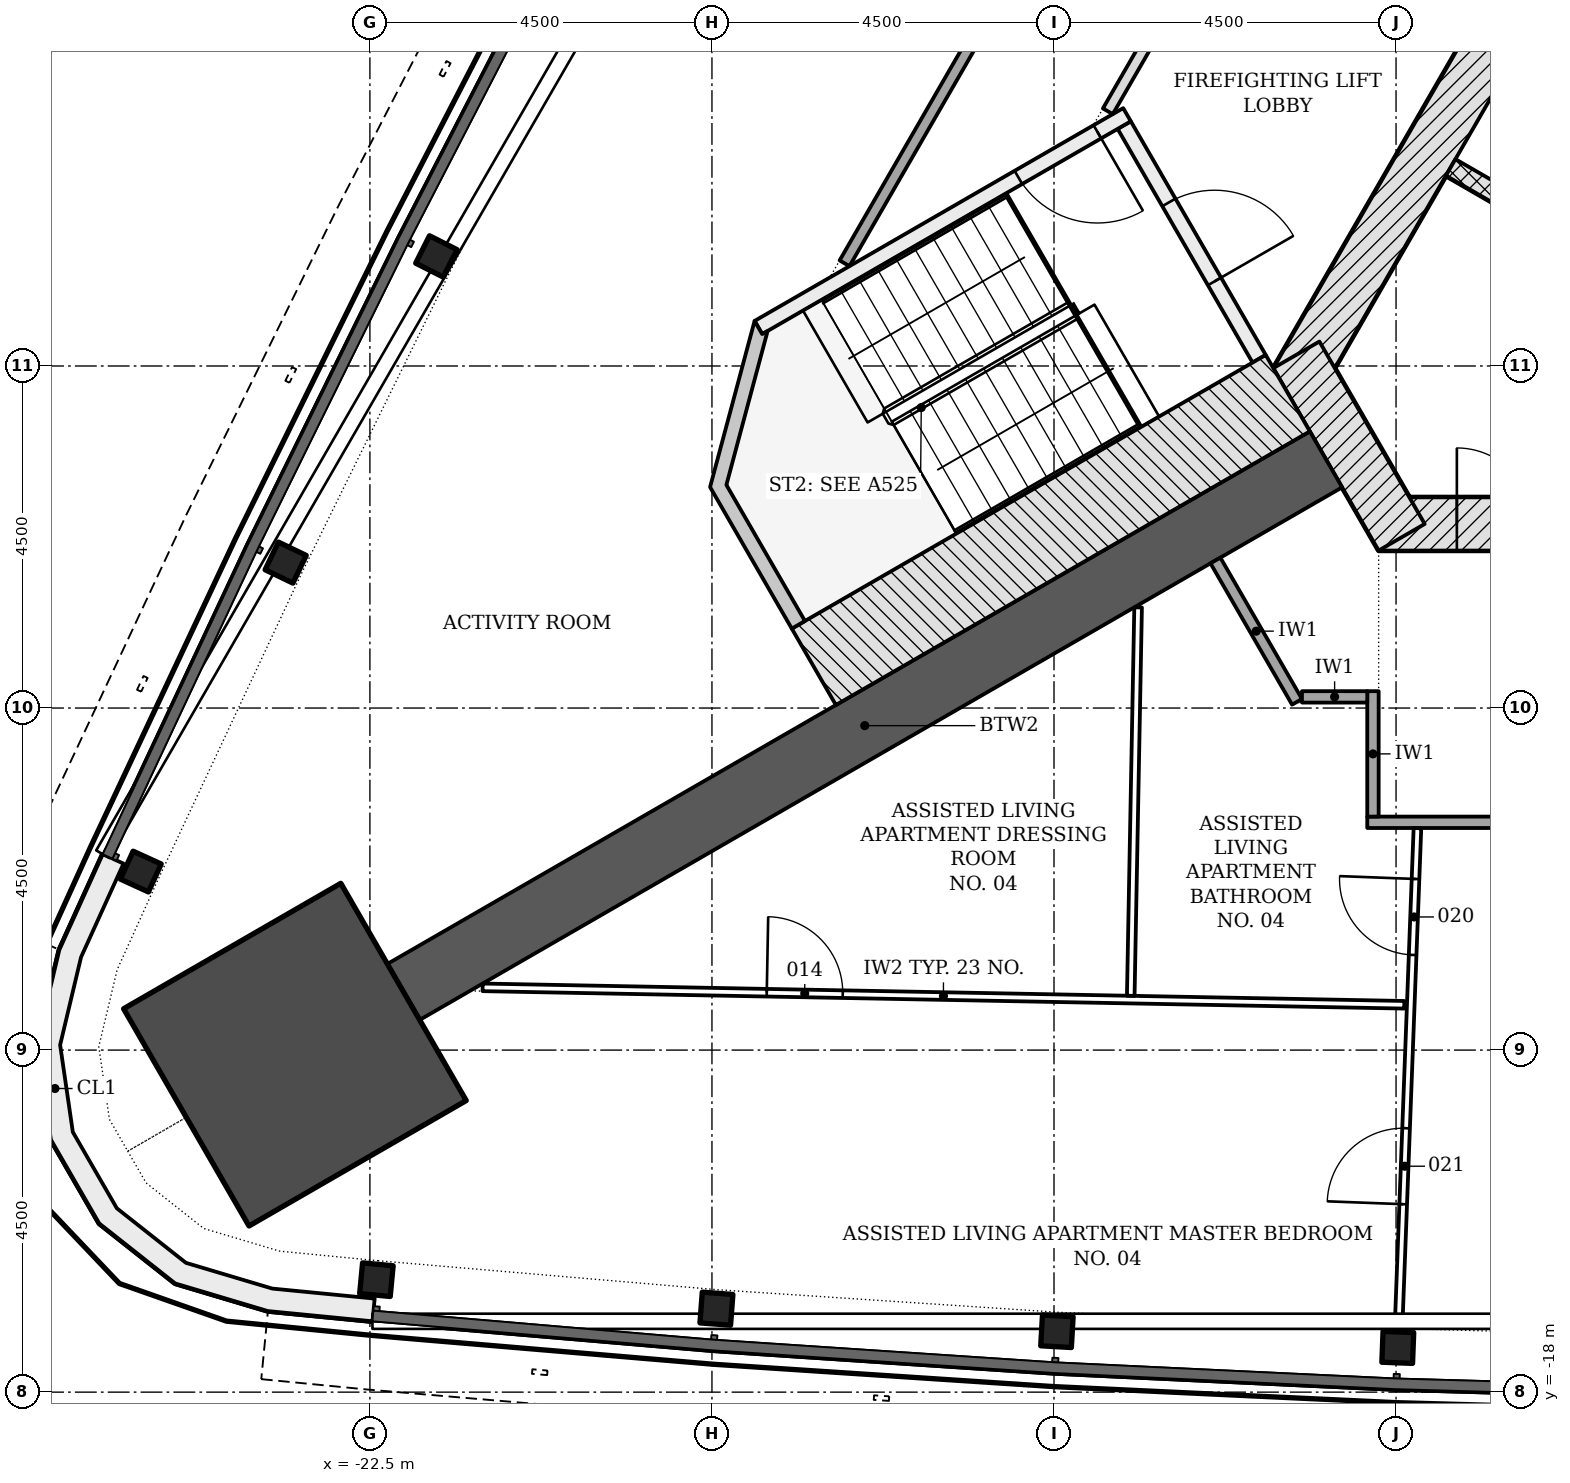
"""IFC4 building model, lengths in metres.
Left out: names, types, materials, properties, quantities, classifications, styles, units other than length and angle.
Written with IfcOpenShell. Run it as: python <this file> out.ifc"""

import sys

from ifc_helpers import new_model, si_unit, direction, frame, frame_2d, origin, origin_2d, place, context, subcontext, project, spatial, polyline, rectangle, i_section, outline, extrude, element, fill, save


model = new_model("IFC4")
c1 = context("Model", 3, precision=1e-05, world=origin(), true_north=direction((0.0, 1.0)))
c2 = subcontext(c1, "Body", "Model", "MODEL_VIEW")
j1 = project(units=[si_unit("LENGTHUNIT", "METRE"), si_unit("PLANEANGLEUNIT", "RADIAN")], contexts=[c1])
p1 = place(None, origin())
s1 = spatial("IfcSite", under=j1, at=p1, CompositionType="ELEMENT")
p2 = place(p1, origin())
s2 = spatial("IfcBuilding", under=s1, at=p2, CompositionType="ELEMENT")
p3 = place(p2, frame((0.0, 0.0, 45.6)))
s3 = spatial("IfcBuildingStorey", under=s2, at=p3, CompositionType="ELEMENT", Elevation=45.6)
p4 = place(p3, frame((-9.229, -6.578, -0.2), z_axis=(0.0, 0.0, 1.0), x_axis=(1.0, 0.0, 0.0)))
e1 = element("IfcWall", 1, at=p4, inside=s3, PredefinedType="SHEAR", context=c2, shape_type="SweptSolid", body=[
    extrude(rectangle(XDim=18.458, YDim=0.7, at=frame_2d((9.229, 0.0))), origin(), (0.0, 0.0, 1.0), 3.6),
])
p5 = place(p4, frame((3.304, 0.0, 0.2)))
e2 = element("IfcOpeningElement", 2, at=p5, cuts=e1, PredefinedType="OPENING", context=c2, shape_type="SweptSolid", body=[
    extrude(rectangle(XDim=1.1, YDim=2.1, at=frame_2d((0.55, 1.05))), frame((0.0, 0.36, 0.0), z_axis=(0.0, -1.0, 0.0), x_axis=(1.0, 0.0, 0.0)), (0.0, 0.0, 1.0), 0.72),
])
p6 = place(p4, frame((5.454, 0.0, 0.2)))
e3 = element("IfcOpeningElement", 3, at=p6, cuts=e1, PredefinedType="OPENING", context=c2, shape_type="SweptSolid", body=[
    extrude(rectangle(XDim=1.1, YDim=2.1, at=frame_2d((0.55, 1.05))), frame((0.0, 0.36, 0.0), z_axis=(0.0, -1.0, 0.0), x_axis=(1.0, 0.0, 0.0)), (0.0, 0.0, 1.0), 0.72),
])
p7 = place(p4, frame((7.604, 0.0, 0.2)))
e4 = element("IfcOpeningElement", 4, at=p7, cuts=e1, PredefinedType="OPENING", context=c2, shape_type="SweptSolid", body=[
    extrude(rectangle(XDim=1.1, YDim=2.1, at=frame_2d((0.55, 1.05))), frame((0.0, 0.36, 0.0), z_axis=(0.0, -1.0, 0.0), x_axis=(1.0, 0.0, 0.0)), (0.0, 0.0, 1.0), 0.72),
])
p8 = place(p4, frame((9.754, 0.0, 0.2)))
e5 = element("IfcOpeningElement", 5, at=p8, cuts=e1, PredefinedType="OPENING", context=c2, shape_type="SweptSolid", body=[
    extrude(rectangle(XDim=1.1, YDim=2.1, at=frame_2d((0.55, 1.05))), frame((0.0, 0.36, 0.0), z_axis=(0.0, -1.0, 0.0), x_axis=(1.0, 0.0, 0.0)), (0.0, 0.0, 1.0), 0.72),
])
p9 = place(p4, frame((11.904, 0.0, 0.2)))
e6 = element("IfcOpeningElement", 6, at=p9, cuts=e1, PredefinedType="OPENING", context=c2, shape_type="SweptSolid", body=[
    extrude(rectangle(XDim=1.1, YDim=2.1, at=frame_2d((0.55, 1.05))), frame((0.0, 0.36, 0.0), z_axis=(0.0, -1.0, 0.0), x_axis=(1.0, 0.0, 0.0)), (0.0, 0.0, 1.0), 0.72),
])
p10 = place(p4, frame((14.054, 0.0, 0.2)))
e7 = element("IfcOpeningElement", 7, at=p10, cuts=e1, PredefinedType="OPENING", context=c2, shape_type="SweptSolid", body=[
    extrude(rectangle(XDim=1.1, YDim=2.1, at=frame_2d((0.55, 1.05))), frame((0.0, 0.36, 0.0), z_axis=(0.0, -1.0, 0.0), x_axis=(1.0, 0.0, 0.0)), (0.0, 0.0, 1.0), 0.72),
])
p11 = place(p4, frame((1.029, 0.0, 0.2)))
e8 = element("IfcOpeningElement", 8, at=p11, cuts=e1, PredefinedType="OPENING", context=c2, shape_type="SweptSolid", body=[
    extrude(rectangle(XDim=1.0, YDim=2.1, at=frame_2d((0.5, 1.05))), frame((0.0, 0.36, 0.0), z_axis=(0.0, -1.0, 0.0), x_axis=(1.0, 0.0, 0.0)), (0.0, 0.0, 1.0), 0.72),
])
p12 = place(p3, frame((-1.083, 11.281, -0.2), z_axis=(0.0, 0.0, 1.0), x_axis=(-0.500001446645, -0.866024568562, 0.0)))
e9 = element("IfcWall", 9, at=p12, inside=s3, PredefinedType="SHEAR", context=c2, shape_type="SweptSolid", body=[
    extrude(rectangle(XDim=18.458, YDim=0.7, at=frame_2d((9.229, 0.0))), origin(), (0.0, 0.0, 1.0), 3.6),
])
p13 = place(p12, frame((8.979, 0.0, 0.2)))
e10 = element("IfcOpeningElement", 10, at=p13, cuts=e9, PredefinedType="OPENING", context=c2, shape_type="SweptSolid", body=[
    extrude(rectangle(XDim=1.2, YDim=2.1, at=frame_2d((0.6, 1.05))), frame((0.0, 0.36, 0.0), z_axis=(0.0, -1.0, 0.0), x_axis=(1.0, 0.0, 0.0)), (0.0, 0.0, 1.0), 0.72),
])
p14 = place(p12, frame((11.029, 0.0, 0.2)))
e11 = element("IfcOpeningElement", 11, at=p14, cuts=e9, PredefinedType="OPENING", context=c2, shape_type="SweptSolid", body=[
    extrude(rectangle(XDim=1.2, YDim=2.1, at=frame_2d((0.6, 1.05))), frame((0.0, 0.36, 0.0), z_axis=(0.0, -1.0, 0.0), x_axis=(1.0, 0.0, 0.0)), (0.0, 0.0, 1.0), 0.72),
])
p15 = place(p3, frame((-10.311, -4.353, -0.2), z_axis=(0.0, 0.0, 1.0), x_axis=(0.500042739161, -0.866000726912, 0.0)))
e12 = element("IfcWall", 12, at=p15, inside=s3, PredefinedType="SHEAR", context=c2, shape_type="SweptSolid", body=[
    extrude(rectangle(XDim=2.771, YDim=0.7, at=frame_2d((1.386, 0.0))), origin(), (0.0, 0.0, 1.0), 3.6),
])
p16 = place(p3, frame((-9.922, -5.728, -0.2), z_axis=(0.0, 0.0, 1.0), x_axis=(-0.866021666006, -0.500006473966, 0.0)))
e13 = element("IfcWall", 13, at=p16, inside=s3, PredefinedType="SHEAR", context=c2, shape_type="SweptSolid", body=[
    extrude(rectangle(XDim=14.013, YDim=0.85, at=frame_2d((7.007, 0.0))), origin(), (0.0, 0.0, 1.0), 3.6),
])
p17 = place(p3, frame((-23.487, -13.56, -0.2), z_axis=(0.0, 0.0, 1.0), x_axis=(-0.866025403784, -0.5, 0.0)))
e14 = element("IfcColumn", 14, at=p17, inside=s3, PredefinedType="COLUMN", context=c2, shape_type="SweptSolid", body=[
    extrude(rectangle(XDim=3.3, YDim=3.3, at=origin_2d()), origin(), (0.0, 0.0, 1.0), 3.6),
])
for number, where, z_axis, x_axis in (
    (15, (-21.626, -3.059, -0.2), (0.0, 0.0, 1.0), (-0.45, -0.893, 0.0)),
    (16, (-23.608, -7.086, -0.2), (0.0, 0.0, 1.0), (-0.433, -0.901, 0.0)),
    (17, (-25.514, -11.151, -0.2), (0.0, 0.0, 1.0), (-0.416, -0.909, 0.0)),
    (18, (-22.415, -16.521, -0.2), (0.0, 0.0, 1.0), (0.996, -0.094, 0.0)),
    (19, (-17.941, -16.902, -0.2), (0.0, 0.0, 1.0), (0.997, -0.076, 0.0)),
    (20, (-13.462, -17.199, -0.2), (0.0, 0.0, 1.0), (0.998, -0.057, 0.0)),
    (21, (-8.977, -17.411, -0.2), (0.0, 0.0, 1.0), (0.999, -0.038, 0.0)),
):
    element("IfcColumn", number, at=place(p3, frame(where, z_axis=z_axis, x_axis=x_axis)), inside=s3, PredefinedType="COLUMN", context=c2, shape_type="SweptSolid", body=[
        extrude(i_section(OverallWidth=0.404, OverallDepth=0.406, WebThickness=0.027, FlangeThickness=0.044, FilletRadius=0.015, at=origin_2d()), origin(), (0.0, 0.0, 1.0), 3.6),
    ])
p18 = place(p3, origin())
e22 = element("IfcWall", 22, at=p18, inside=s3, PredefinedType="NOTDEFINED", context=c2, shape_type="SweptSolid", body=[
    extrude(outline(polyline([(-26.014, -10.923), (-26.586, -12.181), (-26.881, -13.419), (-26.697, -14.679), (-26.061, -15.781), (-25.062, -16.57), (-23.842, -16.933), (-22.467, -17.068), (-22.437, -16.769), (-23.784, -16.638), (-24.921, -16.299), (-25.829, -15.581), (-26.408, -14.578), (-26.575, -13.433), (-26.301, -12.279), (-25.741, -11.047), (-26.014, -10.923)])), origin(), (0.0, 0.0, 1.0), 3.3),
])
p19 = place(p3, frame((-8.281, -1.887, -0.2), z_axis=(0.0, 0.0, 1.0), x_axis=(0.866032775405, -0.499987231761, 0.0)))
e23 = element("IfcWall", 23, at=p19, inside=s3, PredefinedType="PARTITIONING", context=c2, shape_type="SweptSolid", body=[
    extrude(rectangle(XDim=2.9, YDim=0.25, at=frame_2d((1.45, 0.0))), origin(), (0.0, 0.0, 1.0), 3.6),
])
p20 = place(p3, frame((-12.576, -1.331, -0.2), z_axis=(0.0, 0.0, 1.0), x_axis=(0.499970499736, -0.8660424351, 0.0)))
e24 = element("IfcWall", 24, at=p20, inside=s3, PredefinedType="SHEAR", context=c2, shape_type="SweptSolid", body=[
    extrude(rectangle(XDim=3.55, YDim=0.2, at=frame_2d((1.775, 0.0))), origin(), (0.0, 0.0, 1.0), 3.6),
])
p21 = place(p20, frame((1.175, 0.0, 0.2)))
e25 = element("IfcOpeningElement", 25, at=p21, cuts=e24, PredefinedType="OPENING", context=c2, shape_type="SweptSolid", body=[
    extrude(rectangle(XDim=1.2, YDim=2.1, at=frame_2d((0.6, 1.05))), frame((0.0, 0.11, 0.0), z_axis=(0.0, -1.0, 0.0), x_axis=(1.0, 0.0, 0.0)), (0.0, 0.0, 1.0), 0.22),
])
p22 = place(p3, frame((-12.539, -1.194, -0.2), z_axis=(0.0, 0.0, 1.0), x_axis=(-0.866045472092, -0.499965239061, 0.0)))
e26 = element("IfcWall", 26, at=p22, inside=s3, PredefinedType="SHEAR", context=c2, shape_type="SweptSolid", body=[
    extrude(rectangle(XDim=5.6, YDim=0.2, at=frame_2d((2.8, 0.0))), origin(), (0.0, 0.0, 1.0), 3.6),
])
p23 = place(p22, frame((0.45, 0.0, 0.2)))
e27 = element("IfcOpeningElement", 27, at=p23, cuts=e26, PredefinedType="OPENING", context=c2, shape_type="SweptSolid", body=[
    extrude(rectangle(XDim=1.2, YDim=2.1, at=frame_2d((0.6, 1.05))), frame((0.0, 0.11, 0.0), z_axis=(0.0, -1.0, 0.0), x_axis=(1.0, 0.0, 0.0)), (0.0, 0.0, 1.0), 0.22),
])
p24 = place(p3, frame((-10.424, -4.858, -0.2), z_axis=(0.0, 0.0, 1.0), x_axis=(-0.866033125095, -0.499986626058, 0.0)))
e28 = element("IfcWall", 28, at=p24, inside=s3, PredefinedType="SHEAR", context=c2, shape_type="SweptSolid", body=[
    extrude(rectangle(XDim=7.2, YDim=1.161, at=frame_2d((3.6, 0.0))), origin(), (0.0, 0.0, 1.0), 3.6),
])
p25 = place(p3, frame((0.0, 0.0, -0.2)))
e29 = element("IfcWall", 29, at=p25, inside=s3, PredefinedType="SHEAR", context=c2, shape_type="SweptSolid", body=[
    extrude(outline(polyline([(-17.439, -3.907), (-18.025, -6.093), (-16.95, -7.955), (-16.777, -7.855), (-17.81, -6.065), (-17.267, -4.039), (-17.339, -4.081), (-17.339, -4.081), (-17.339, -4.081), (-17.339, -4.081), (-17.339, -4.081), (-17.339, -4.081), (-17.339, -4.081), (-17.339, -4.081), (-17.339, -4.081), (-17.339, -4.081), (-17.339, -4.081), (-17.339, -4.081), (-17.339, -4.081), (-17.339, -4.081), (-17.339, -4.081), (-17.339, -4.081), (-17.339, -4.081), (-17.439, -3.907)])), origin(), (0.0, 0.0, 1.0), 3.6),
])
p26 = place(p3, frame((-16.256, -3.149, 0.0), z_axis=(0.0, 0.0, 1.0), x_axis=(0.499999683919, 0.866025586274, 0.0)))
e30 = element("IfcWall", 30, at=p26, inside=s3, PredefinedType="PARTITIONING", context=c2, shape_type="SweptSolid", body=[
    extrude(rectangle(XDim=22.234, YDim=0.15, at=frame_2d((11.117, 0.0))), origin(), (0.0, 0.0, 1.0), 2.778),
])
p27 = place(p26, frame((17.842, 0.0, 0.0)))
e31 = element("IfcOpeningElement", 31, at=p27, cuts=e30, PredefinedType="OPENING", context=c2, shape_type="SweptSolid", body=[
    extrude(rectangle(XDim=1.0, YDim=2.1, at=frame_2d((0.5, 1.05))), frame((0.0, 0.085, 0.0), z_axis=(0.0, -1.0, 0.0), x_axis=(1.0, 0.0, 0.0)), (0.0, 0.0, 1.0), 0.17),
])
p28 = place(p26, frame((15.26, 0.0, 0.0)))
e32 = element("IfcOpeningElement", 32, at=p28, cuts=e30, PredefinedType="OPENING", context=c2, shape_type="SweptSolid", body=[
    extrude(rectangle(XDim=1.0, YDim=2.1, at=frame_2d((0.5, 1.05))), frame((0.0, 0.085, 0.0), z_axis=(0.0, -1.0, 0.0), x_axis=(1.0, 0.0, 0.0)), (0.0, 0.0, 1.0), 0.17),
])
p29 = place(p26, frame((11.92, 0.0, 0.0)))
e33 = element("IfcOpeningElement", 33, at=p29, cuts=e30, PredefinedType="OPENING", context=c2, shape_type="SweptSolid", body=[
    extrude(rectangle(XDim=1.5, YDim=2.1, at=frame_2d((0.75, 1.05))), frame((0.0, 0.085, 0.0), z_axis=(0.0, -1.0, 0.0), x_axis=(1.0, 0.0, 0.0)), (0.0, 0.0, 1.0), 0.17),
])
p30 = place(p26, frame((4.547, 0.0, 0.0)))
e34 = element("IfcOpeningElement", 34, at=p30, cuts=e30, PredefinedType="OPENING", context=c2, shape_type="SweptSolid", body=[
    extrude(rectangle(XDim=1.5, YDim=2.1, at=frame_2d((0.75, 1.05))), frame((0.0, 0.085, 0.0), z_axis=(0.0, -1.0, 0.0), x_axis=(1.0, 0.0, 0.0)), (0.0, 0.0, 1.0), 0.17),
])
p31 = place(p3, frame((-4.407, 13.374, 0.0), z_axis=(0.0, 0.0, 1.0), x_axis=(-0.499997181693, -0.866027030928, 0.0)))
e35 = element("IfcWall", 35, at=p31, inside=s3, PredefinedType="PARTITIONING", context=c2, shape_type="SweptSolid", body=[
    extrude(rectangle(XDim=16.77, YDim=0.15, at=frame_2d((8.385, 0.0))), origin(), (0.0, 0.0, 1.0), 2.778),
])
p32 = place(p31, frame((8.879, 0.0, 0.0)))
e36 = element("IfcOpeningElement", 36, at=p32, cuts=e35, PredefinedType="OPENING", context=c2, shape_type="SweptSolid", body=[
    extrude(rectangle(XDim=1.0, YDim=2.1, at=frame_2d((0.5, 1.05))), frame((0.0, 0.085, 0.0), z_axis=(0.0, -1.0, 0.0), x_axis=(1.0, 0.0, 0.0)), (0.0, 0.0, 1.0), 0.17),
])
p33 = place(p3, frame((3.689, -10.503, 0.0), z_axis=(0.0, 0.0, 1.0), x_axis=(-1.0, 0.0, 0.0)))
e37 = element("IfcWall", 37, at=p33, inside=s3, PredefinedType="PARTITIONING", context=c2, shape_type="SweptSolid", body=[
    extrude(rectangle(XDim=13.068, YDim=0.15, at=frame_2d((6.534, 0.0))), origin(), (0.0, 0.0, 1.0), 2.778),
])
p34 = place(p33, frame((9.74, 0.0, 0.0)))
e38 = element("IfcOpeningElement", 38, at=p34, cuts=e37, PredefinedType="OPENING", context=c2, shape_type="SweptSolid", body=[
    extrude(rectangle(XDim=1.0, YDim=2.1, at=frame_2d((0.5, 1.05))), frame((0.0, 0.085, 0.0), z_axis=(0.0, -1.0, 0.0), x_axis=(1.0, 0.0, 0.0)), (0.0, 0.0, 1.0), 0.17),
])
p35 = place(p33, frame((4.175, 0.0, 0.0)))
e39 = element("IfcOpeningElement", 39, at=p35, cuts=e37, PredefinedType="OPENING", context=c2, shape_type="SweptSolid", body=[
    extrude(rectangle(XDim=1.0, YDim=2.1, at=frame_2d((0.5, 1.05))), frame((0.0, 0.085, 0.0), z_axis=(0.0, -1.0, 0.0), x_axis=(1.0, 0.0, 0.0)), (0.0, 0.0, 1.0), 0.17),
])
p36 = place(p3, frame((-11.376, -7.059, 0.0), z_axis=(0.0, 0.0, 1.0), x_axis=(0.500076779081, -0.865981070823, 0.0)))
e40 = element("IfcWall", 40, at=p36, inside=s3, PredefinedType="PARTITIONING", context=c2, shape_type="SweptSolid", body=[
    extrude(rectangle(XDim=2.147, YDim=0.15, at=frame_2d((1.074, 0.0))), origin(), (0.0, 0.0, 1.0), 3.4),
])
p37 = place(p3, frame((-9.304, -10.428, 0.0), z_axis=(0.0, 0.0, 1.0), x_axis=(0.0, 1.0, 0.0)))
e41 = element("IfcWall", 41, at=p37, inside=s3, PredefinedType="PARTITIONING", context=c2, shape_type="SweptSolid", body=[
    extrude(rectangle(XDim=1.65, YDim=0.15, at=frame_2d((0.825, 0.0))), origin(), (0.0, 0.0, 1.0), 3.4),
])
p38 = place(p3, frame((-10.238, -8.853, 0.0), z_axis=(0.0, 0.0, 1.0), x_axis=(1.0, 0.0, 0.0)))
e42 = element("IfcWall", 42, at=p38, inside=s3, PredefinedType="PARTITIONING", context=c2, shape_type="SweptSolid", body=[
    extrude(rectangle(XDim=0.859, YDim=0.15, at=frame_2d((0.43, 0.0))), origin(), (0.0, 0.0, 1.0), 3.4),
])
p39 = place(p3, frame((-21.017, -12.675, 0.0), z_axis=(0.0, 0.0, 1.0), x_axis=(0.999821316728, -0.018903296414, 0.0)))
e43 = element("IfcWall", 43, at=p39, inside=s3, PredefinedType="PARTITIONING", context=c2, shape_type="SweptSolid", body=[
    extrude(rectangle(XDim=12.127, YDim=0.1, at=frame_2d((6.064, 0.0))), origin(), (0.0, 0.0, 1.0), 2.778),
])
p40 = place(p39, frame((3.739, 0.0, 0.0)))
e44 = element("IfcOpeningElement", 44, at=p40, cuts=e43, PredefinedType="OPENING", context=c2, shape_type="SweptSolid", body=[
    extrude(rectangle(XDim=1.0, YDim=2.1, at=frame_2d((0.5, 1.05))), frame((0.0, 0.06, 0.0), z_axis=(0.0, -1.0, 0.0), x_axis=(1.0, 0.0, 0.0)), (0.0, 0.0, 1.0), 0.12),
])
p41 = place(p3, frame((-8.968, -17.162, 0.0), z_axis=(0.0, 0.0, 1.0), x_axis=(0.037809580141, 0.999284962185, 0.0)))
e45 = element("IfcWall", 45, at=p41, inside=s3, PredefinedType="PARTITIONING", context=c2, shape_type="SweptSolid", body=[
    extrude(rectangle(XDim=6.586, YDim=0.1, at=frame_2d((3.293, 0.0))), origin(), (0.0, 0.0, 1.0), 2.778),
])
p42 = place(p41, frame((4.917, 0.0, 0.0)))
e46 = element("IfcOpeningElement", 46, at=p42, cuts=e45, PredefinedType="OPENING", context=c2, shape_type="SweptSolid", body=[
    extrude(rectangle(XDim=1.0, YDim=2.1, at=frame_2d((0.5, 1.05))), frame((0.0, 0.06, 0.0), z_axis=(0.0, -1.0, 0.0), x_axis=(1.0, 0.0, 0.0)), (0.0, 0.0, 1.0), 0.12),
])
p43 = place(p41, frame((1.635, 0.0, 0.0)))
e47 = element("IfcOpeningElement", 47, at=p43, cuts=e45, PredefinedType="OPENING", context=c2, shape_type="SweptSolid", body=[
    extrude(rectangle(XDim=1.0, YDim=2.1, at=frame_2d((0.5, 1.05))), frame((0.0, 0.06, 0.0), z_axis=(0.0, -1.0, 0.0), x_axis=(1.0, 0.0, 0.0)), (0.0, 0.0, 1.0), 0.12),
])
p44 = place(p3, frame((-12.49, -12.786, 0.0), z_axis=(0.0, 0.0, 1.0), x_axis=(0.018916824658, 0.999821060863, 0.0)))
e48 = element("IfcWall", 48, at=p44, inside=s3, PredefinedType="PARTITIONING", context=c2, shape_type="SweptSolid", body=[
    extrude(rectangle(XDim=5.111, YDim=0.1, at=frame_2d((2.555, 0.0))), origin(), (0.0, 0.0, 1.0), 3.4),
])
p45 = place(p11, origin())
e49 = element("IfcDoor", 49, at=p45, inside=s3, OperationType="SINGLE_SWING_LEFT", PredefinedType="DOOR", context=c2, shape_type="SweptSolid", body=[
    extrude(rectangle(XDim=1.0, YDim=2.1, at=frame_2d((0.5, 1.05))), frame((0.0, 0.075, 0.0), z_axis=(0.0, -1.0, 0.0), x_axis=(1.0, 0.0, 0.0)), (0.0, 0.0, 1.0), 0.15),
])
fill(e8, e49)
p46 = place(p21, origin())
e50 = element("IfcDoor", 50, at=p46, inside=s3, OperationType="SINGLE_SWING_RIGHT", PredefinedType="DOOR", context=c2, shape_type="SweptSolid", body=[
    extrude(rectangle(XDim=1.2, YDim=2.1, at=frame_2d((0.6, 1.05))), frame((0.0, 0.025, 0.0), z_axis=(0.0, -1.0, 0.0), x_axis=(1.0, 0.0, 0.0)), (0.0, 0.0, 1.0), 0.05),
])
fill(e25, e50)
p47 = place(p23, origin())
e51 = element("IfcDoor", 51, at=p47, inside=s3, OperationType="SINGLE_SWING_LEFT", PredefinedType="DOOR", context=c2, shape_type="SweptSolid", body=[
    extrude(rectangle(XDim=1.2, YDim=2.1, at=frame_2d((0.6, 1.05))), frame((0.0, 0.025, 0.0), z_axis=(0.0, -1.0, 0.0), x_axis=(1.0, 0.0, 0.0)), (0.0, 0.0, 1.0), 0.05),
])
fill(e27, e51)
p48 = place(p40, origin())
e52 = element("IfcDoor", 52, at=p48, inside=s3, OperationType="SINGLE_SWING_LEFT", PredefinedType="DOOR", context=c2, shape_type="SweptSolid", body=[
    extrude(rectangle(XDim=1.0, YDim=2.1, at=frame_2d((0.5, 1.05))), frame((0.0, 0.025, 0.0), z_axis=(0.0, -1.0, 0.0), x_axis=(1.0, 0.0, 0.0)), (0.0, 0.0, 1.0), 0.05),
])
fill(e44, e52)
p49 = place(p42, origin())
e53 = element("IfcDoor", 53, at=p49, inside=s3, OperationType="SINGLE_SWING_RIGHT", PredefinedType="DOOR", context=c2, shape_type="SweptSolid", body=[
    extrude(rectangle(XDim=1.0, YDim=2.1, at=frame_2d((0.5, 1.05))), frame((0.0, 0.025, 0.0), z_axis=(0.0, -1.0, 0.0), x_axis=(1.0, 0.0, 0.0)), (0.0, 0.0, 1.0), 0.05),
])
fill(e46, e53)
p50 = place(p43, origin())
e54 = element("IfcDoor", 54, at=p50, inside=s3, OperationType="SINGLE_SWING_LEFT", PredefinedType="DOOR", context=c2, shape_type="SweptSolid", body=[
    extrude(rectangle(XDim=1.0, YDim=2.1, at=frame_2d((0.5, 1.05))), frame((0.0, 0.025, 0.0), z_axis=(0.0, -1.0, 0.0), x_axis=(1.0, 0.0, 0.0)), (0.0, 0.0, 1.0), 0.05),
])
fill(e47, e54)
save(model, sys.argv[1])
